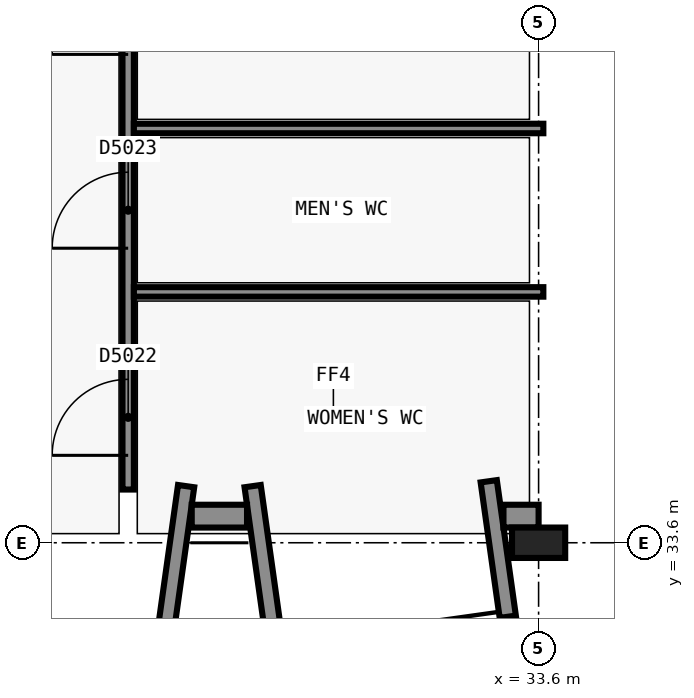
"""IFC4 building model, lengths in metres.
Left out: names, types, materials, properties, quantities, classifications, styles, units other than length and angle.
Written with IfcOpenShell. Run it as: python <this file> out.ifc"""

import sys

from ifc_helpers import new_model, si_unit, direction, frame, frame_2d, origin, origin_2d, place, context, subcontext, project, spatial, rectangle, extrude, element, fill, save


model = new_model("IFC4")
c1 = context("Model", 3, precision=1e-05, world=origin(), true_north=direction((0.0, 1.0)))
c2 = subcontext(c1, "Body", "Model", "MODEL_VIEW")
j1 = project(units=[si_unit("LENGTHUNIT", "METRE"), si_unit("PLANEANGLEUNIT", "RADIAN")], contexts=[c1])
p1 = place(None, origin())
s1 = spatial("IfcSite", under=j1, at=p1, CompositionType="ELEMENT")
p2 = place(p1, origin())
s2 = spatial("IfcBuilding", under=s1, at=p2, CompositionType="ELEMENT")
p3 = place(p2, frame((0.0, 0.0, 24.6)))
s3 = spatial("IfcBuildingStorey", under=s2, at=p3, CompositionType="ELEMENT", Elevation=24.6)
p4 = place(p3, frame((33.6, 33.6, 0.0), z_axis=(0.0, 0.0, 1.0), x_axis=(1.0, 0.0, 0.0)))
e1 = element("IfcColumn", 1, at=p4, inside=s3, PredefinedType="COLUMN", context=c2, shape_type="SweptSolid", body=[
    extrude(rectangle(XDim=0.7, YDim=0.4, at=origin_2d()), origin(), (0.0, 0.0, 1.0), 4.5),
])
p5 = place(p3, frame((28.962, 34.345, 0.0), z_axis=(0.0, 0.0, 1.0), x_axis=(-0.139230687381, -0.99025997379, 0.0)))
e2 = element("IfcWall", 2, at=p5, inside=s3, PredefinedType="SOLIDWALL", context=c2, shape_type="SweptSolid", body=[
    extrude(rectangle(XDim=2.169, YDim=0.215, at=frame_2d((1.084, 0.0))), origin(), (0.0, 0.0, 1.0), 4.2),
])
p6 = place(p3, frame((29.838, 34.345, 0.0), z_axis=(0.0, 0.0, 1.0), x_axis=(0.139120311566, -0.990275486372, 0.0)))
e3 = element("IfcWall", 3, at=p6, inside=s3, PredefinedType="SOLIDWALL", context=c2, shape_type="SweptSolid", body=[
    extrude(rectangle(XDim=2.169, YDim=0.215, at=frame_2d((1.084, 0.0))), origin(), (0.0, 0.0, 1.0), 4.2),
])
p7 = place(p3, frame((32.944, 34.409, 0.0), z_axis=(0.0, 0.0, 1.0), x_axis=(0.13918000587, -0.990267098295, 0.0)))
e4 = element("IfcWall", 4, at=p7, inside=s3, PredefinedType="SOLIDWALL", context=c2, shape_type="SweptSolid", body=[
    extrude(rectangle(XDim=1.8, YDim=0.215, at=frame_2d((0.9, 0.0))), origin(), (0.0, 0.0, 1.0), 4.2),
])
p8 = place(p3, frame((29.764, 33.95, 0.0), z_axis=(0.0, 0.0, 1.0), x_axis=(-1.0, 0.0, 0.0)))
e5 = element("IfcWall", 5, at=p8, inside=s3, PredefinedType="SOLIDWALL", context=c2, shape_type="SweptSolid", body=[
    extrude(rectangle(XDim=0.728, YDim=0.3, at=frame_2d((0.364, 0.0))), origin(), (0.0, 0.0, 1.0), 3.962),
])
p9 = place(p3, frame((33.6, 33.95, 0.0), z_axis=(0.0, 0.0, 1.0), x_axis=(-1.0, 0.0, 0.0)))
e6 = element("IfcWall", 6, at=p9, inside=s3, PredefinedType="SOLIDWALL", context=c2, shape_type="SweptSolid", body=[
    extrude(rectangle(XDim=0.462, YDim=0.3, at=frame_2d((0.231, 0.0))), origin(), (0.0, 0.0, 1.0), 3.962),
])
p10 = place(p3, frame((28.2, 34.3, 0.0), z_axis=(0.0, 0.0, 1.0), x_axis=(0.0, 1.0, 0.0)))
e7 = element("IfcWall", 7, at=p10, inside=s3, PredefinedType="PARTITIONING", context=c2, shape_type="SweptSolid", body=[
    extrude(rectangle(XDim=7.475, YDim=0.15, at=frame_2d((3.737, 0.0))), origin(), (0.0, 0.0, 1.0), 4.1),
])
p11 = place(p10, frame((0.45, 0.0, 0.0)))
e8 = element("IfcOpeningElement", 8, at=p11, cuts=e7, PredefinedType="OPENING", context=c2, shape_type="SweptSolid", body=[
    extrude(rectangle(XDim=1.0, YDim=2.1, at=frame_2d((0.5, 1.05))), frame((0.0, 0.085, 0.0), z_axis=(0.0, -1.0, 0.0), x_axis=(1.0, 0.0, 0.0)), (0.0, 0.0, 1.0), 0.17),
])
p12 = place(p10, frame((3.175, 0.0, 0.0)))
e9 = element("IfcOpeningElement", 9, at=p12, cuts=e7, PredefinedType="OPENING", context=c2, shape_type="SweptSolid", body=[
    extrude(rectangle(XDim=1.0, YDim=2.1, at=frame_2d((0.5, 1.05))), frame((0.0, 0.085, 0.0), z_axis=(0.0, -1.0, 0.0), x_axis=(1.0, 0.0, 0.0)), (0.0, 0.0, 1.0), 0.17),
])
p13 = place(p10, frame((5.725, 0.0, 0.0)))
e10 = element("IfcOpeningElement", 10, at=p13, cuts=e7, PredefinedType="OPENING", context=c2, shape_type="SweptSolid", body=[
    extrude(rectangle(XDim=1.0, YDim=2.1, at=frame_2d((0.5, 1.05))), frame((0.0, 0.085, 0.0), z_axis=(0.0, -1.0, 0.0), x_axis=(1.0, 0.0, 0.0)), (0.0, 0.0, 1.0), 0.17),
])
for number, where, z_axis, x_axis in (
    (11, (28.275, 36.9, 0.0), (0.0, 0.0, 1.0), (1.0, 0.0, 0.0)),
    (12, (28.275, 39.05, 0.0), (0.0, 0.0, 1.0), (1.0, 0.0, 0.0)),
):
    element("IfcWall", number, at=place(p3, frame(where, z_axis=z_axis, x_axis=x_axis)), inside=s3, PredefinedType="PARTITIONING", context=c2, shape_type="SweptSolid", body=[
        extrude(rectangle(XDim=5.388, YDim=0.125, at=frame_2d((2.694, 0.0))), origin(), (0.0, 0.0, 1.0), 3.4),
    ])
p14 = place(p11, origin())
e13 = element("IfcDoor", 13, at=p14, inside=s3, OperationType="SINGLE_SWING_RIGHT", PredefinedType="DOOR", context=c2, shape_type="SweptSolid", body=[
    extrude(rectangle(XDim=1.0, YDim=2.1, at=frame_2d((0.5, 1.05))), frame((0.0, 0.025, 0.0), z_axis=(0.0, -1.0, 0.0), x_axis=(1.0, 0.0, 0.0)), (0.0, 0.0, 1.0), 0.05),
])
fill(e8, e13)
p15 = place(p12, origin())
e14 = element("IfcDoor", 14, at=p15, inside=s3, OperationType="SINGLE_SWING_LEFT", PredefinedType="DOOR", context=c2, shape_type="SweptSolid", body=[
    extrude(rectangle(XDim=1.0, YDim=2.1, at=frame_2d((0.5, 1.05))), frame((0.0, 0.025, 0.0), z_axis=(0.0, -1.0, 0.0), x_axis=(1.0, 0.0, 0.0)), (0.0, 0.0, 1.0), 0.05),
])
fill(e9, e14)
p16 = place(p13, origin())
e15 = element("IfcDoor", 15, at=p16, inside=s3, OperationType="SINGLE_SWING_RIGHT", PredefinedType="DOOR", context=c2, shape_type="SweptSolid", body=[
    extrude(rectangle(XDim=1.0, YDim=2.1, at=frame_2d((0.5, 1.05))), frame((0.0, 0.025, 0.0), z_axis=(0.0, -1.0, 0.0), x_axis=(1.0, 0.0, 0.0)), (0.0, 0.0, 1.0), 0.05),
])
fill(e10, e15)
save(model, sys.argv[1])
